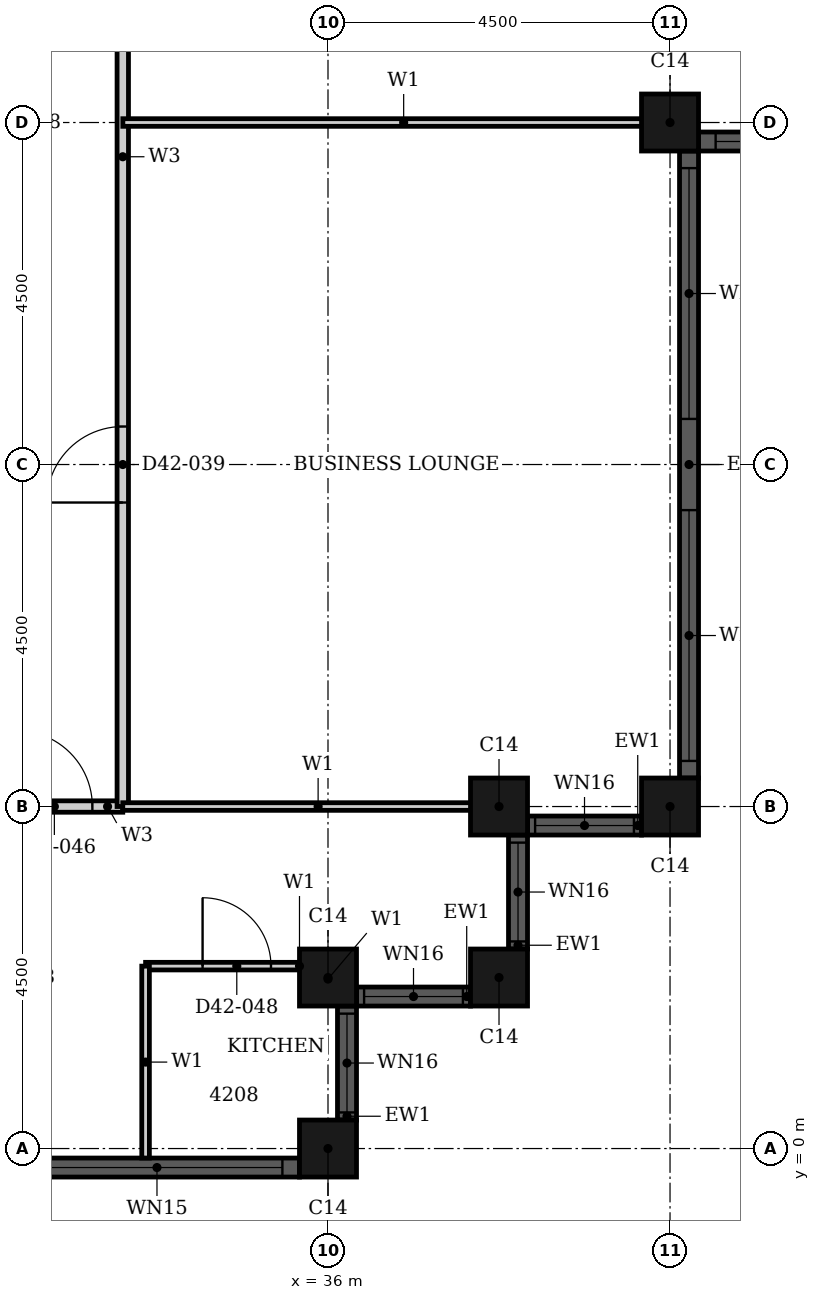
"""IFC4 building model, lengths in metres.
Left out: names, types, materials, properties, quantities, classifications, styles, units other than length and angle.
Written with IfcOpenShell. Run it as: python <this file> out.ifc"""

import sys

from ifc_helpers import new_model, si_unit, direction, frame, frame_2d, origin, origin_2d, place, context, subcontext, project, spatial, rectangle, hollow_rectangle, extrude, element, fill, save


model = new_model("IFC4")
c1 = context("Model", 3, precision=1e-05, world=origin(), true_north=direction((0.0, 1.0)))
c2 = subcontext(c1, "Body", "Model", "MODEL_VIEW")
j1 = project(units=[si_unit("LENGTHUNIT", "METRE"), si_unit("PLANEANGLEUNIT", "RADIAN")], contexts=[c1])
p1 = place(None, origin())
s1 = spatial("IfcSite", under=j1, at=p1, CompositionType="ELEMENT")
p2 = place(p1, origin())
s2 = spatial("IfcBuilding", under=s1, at=p2, CompositionType="ELEMENT")
p3 = place(p2, frame((0.0, 0.0, 169.1)))
s3 = spatial("IfcBuildingStorey", under=s2, at=p3, CompositionType="ELEMENT", Elevation=169.1)
for number, where, z_axis, x_axis in (
    (1, (36.0, 0.0, 0.0), (0.0, 0.0, 1.0), (1.0, 0.0, 0.0)),
    (2, (36.0, 2.25, 0.0), (0.0, 0.0, 1.0), (1.0, 0.0, 0.0)),
    (3, (38.25, 2.25, 0.0), (0.0, 0.0, 1.0), (1.0, 0.0, 0.0)),
    (4, (38.25, 4.5, 0.0), (0.0, 0.0, 1.0), (1.0, 0.0, 0.0)),
    (5, (40.5, 4.5, 0.0), (0.0, 0.0, 1.0), (1.0, 0.0, 0.0)),
    (6, (40.5, 13.5, 0.0), (0.0, 0.0, 1.0), (1.0, 0.0, 0.0)),
):
    element("IfcColumn", number, at=place(p3, frame(where, z_axis=z_axis, x_axis=x_axis)), inside=s3, PredefinedType="COLUMN", context=c2, shape_type="SweptSolid", body=[
        extrude(hollow_rectangle(XDim=0.75, YDim=0.75, WallThickness=0.024, at=origin_2d()), origin(), (0.0, 0.0, 1.0), 3.7),
    ])
p4 = place(p3, frame((27.375, -0.25, 0.0), z_axis=(0.0, 0.0, 1.0), x_axis=(1.0, 0.0, 0.0)))
e7 = element("IfcWall", 7, at=p4, inside=s3, PredefinedType="SOLIDWALL", context=c2, shape_type="SweptSolid", body=[
    extrude(rectangle(XDim=8.25, YDim=0.25, at=frame_2d((4.125, 0.0))), origin(), (0.0, 0.0, 1.0), 3.7),
])
p5 = place(p4, frame((0.225, 0.0, 0.45)))
e8 = element("IfcOpeningElement", 8, at=p5, cuts=e7, PredefinedType="OPENING", context=c2, shape_type="SweptSolid", body=[
    extrude(rectangle(XDim=3.3, YDim=2.3, at=frame_2d((1.65, 1.15))), frame((0.0, 0.135, 0.0), z_axis=(0.0, -1.0, 0.0), x_axis=(1.0, 0.0, 0.0)), (0.0, 0.0, 1.0), 0.27),
])
p6 = place(p4, frame((4.725, 0.0, 0.45)))
e9 = element("IfcOpeningElement", 9, at=p6, cuts=e7, PredefinedType="OPENING", context=c2, shape_type="SweptSolid", body=[
    extrude(rectangle(XDim=3.3, YDim=2.3, at=frame_2d((1.65, 1.15))), frame((0.0, 0.135, 0.0), z_axis=(0.0, -1.0, 0.0), x_axis=(1.0, 0.0, 0.0)), (0.0, 0.0, 1.0), 0.27),
])
p7 = place(p3, frame((36.25, 0.375, 0.0), z_axis=(0.0, 0.0, 1.0), x_axis=(0.0, 1.0, 0.0)))
e10 = element("IfcWall", 10, at=p7, inside=s3, PredefinedType="SOLIDWALL", context=c2, shape_type="SweptSolid", body=[
    extrude(rectangle(XDim=1.5, YDim=0.25, at=frame_2d((0.75, 0.0))), origin(), (0.0, 0.0, 1.0), 3.7),
])
p8 = place(p7, frame((0.1, 0.0, 0.9)))
e11 = element("IfcOpeningElement", 11, at=p8, cuts=e10, PredefinedType="OPENING", context=c2, shape_type="SweptSolid", body=[
    extrude(rectangle(XDim=1.3, YDim=1.85, at=frame_2d((0.65, 0.925))), frame((0.0, 0.135, 0.0), z_axis=(0.0, -1.0, 0.0), x_axis=(1.0, 0.0, 0.0)), (0.0, 0.0, 1.0), 0.27),
])
p9 = place(p3, frame((36.375, 2.0, 0.0), z_axis=(0.0, 0.0, 1.0), x_axis=(1.0, 0.0, 0.0)))
e12 = element("IfcWall", 12, at=p9, inside=s3, PredefinedType="SOLIDWALL", context=c2, shape_type="SweptSolid", body=[
    extrude(rectangle(XDim=1.5, YDim=0.25, at=frame_2d((0.75, 0.0))), origin(), (0.0, 0.0, 1.0), 3.7),
])
p10 = place(p9, frame((0.1, 0.0, 0.9)))
e13 = element("IfcOpeningElement", 13, at=p10, cuts=e12, PredefinedType="OPENING", context=c2, shape_type="SweptSolid", body=[
    extrude(rectangle(XDim=1.3, YDim=1.85, at=frame_2d((0.65, 0.925))), frame((0.0, 0.135, 0.0), z_axis=(0.0, -1.0, 0.0), x_axis=(1.0, 0.0, 0.0)), (0.0, 0.0, 1.0), 0.27),
])
p11 = place(p3, frame((38.5, 2.625, 0.0), z_axis=(0.0, 0.0, 1.0), x_axis=(0.0, 1.0, 0.0)))
e14 = element("IfcWall", 14, at=p11, inside=s3, PredefinedType="SOLIDWALL", context=c2, shape_type="SweptSolid", body=[
    extrude(rectangle(XDim=1.5, YDim=0.25, at=frame_2d((0.75, 0.0))), origin(), (0.0, 0.0, 1.0), 3.7),
])
p12 = place(p11, frame((0.1, 0.0, 0.9)))
e15 = element("IfcOpeningElement", 15, at=p12, cuts=e14, PredefinedType="OPENING", context=c2, shape_type="SweptSolid", body=[
    extrude(rectangle(XDim=1.3, YDim=1.85, at=frame_2d((0.65, 0.925))), frame((0.0, 0.135, 0.0), z_axis=(0.0, -1.0, 0.0), x_axis=(1.0, 0.0, 0.0)), (0.0, 0.0, 1.0), 0.27),
])
p13 = place(p3, frame((38.625, 4.25, 0.0), z_axis=(0.0, 0.0, 1.0), x_axis=(1.0, 0.0, 0.0)))
e16 = element("IfcWall", 16, at=p13, inside=s3, PredefinedType="SOLIDWALL", context=c2, shape_type="SweptSolid", body=[
    extrude(rectangle(XDim=1.5, YDim=0.25, at=frame_2d((0.75, 0.0))), origin(), (0.0, 0.0, 1.0), 3.7),
])
p14 = place(p13, frame((0.1, 0.0, 0.9)))
e17 = element("IfcOpeningElement", 17, at=p14, cuts=e16, PredefinedType="OPENING", context=c2, shape_type="SweptSolid", body=[
    extrude(rectangle(XDim=1.3, YDim=1.85, at=frame_2d((0.65, 0.925))), frame((0.0, 0.135, 0.0), z_axis=(0.0, -1.0, 0.0), x_axis=(1.0, 0.0, 0.0)), (0.0, 0.0, 1.0), 0.27),
])
p15 = place(p3, frame((40.75, 4.875, 0.0), z_axis=(0.0, 0.0, 1.0), x_axis=(0.0, 1.0, 0.0)))
e18 = element("IfcWall", 18, at=p15, inside=s3, PredefinedType="SOLIDWALL", context=c2, shape_type="SweptSolid", body=[
    extrude(rectangle(XDim=8.25, YDim=0.25, at=frame_2d((4.125, 0.0))), origin(), (0.0, 0.0, 1.0), 3.7),
])
p16 = place(p15, frame((0.225, 0.0, 0.45)))
e19 = element("IfcOpeningElement", 19, at=p16, cuts=e18, PredefinedType="OPENING", context=c2, shape_type="SweptSolid", body=[
    extrude(rectangle(XDim=3.3, YDim=2.3, at=frame_2d((1.65, 1.15))), frame((0.0, 0.135, 0.0), z_axis=(0.0, -1.0, 0.0), x_axis=(1.0, 0.0, 0.0)), (0.0, 0.0, 1.0), 0.27),
])
p17 = place(p15, frame((4.725, 0.0, 0.45)))
e20 = element("IfcOpeningElement", 20, at=p17, cuts=e18, PredefinedType="OPENING", context=c2, shape_type="SweptSolid", body=[
    extrude(rectangle(XDim=3.3, YDim=2.3, at=frame_2d((1.65, 1.15))), frame((0.0, 0.135, 0.0), z_axis=(0.0, -1.0, 0.0), x_axis=(1.0, 0.0, 0.0)), (0.0, 0.0, 1.0), 0.27),
])
p18 = place(p3, frame((40.875, 13.25, 0.0), z_axis=(0.0, 0.0, 1.0), x_axis=(1.0, 0.0, 0.0)))
e21 = element("IfcWall", 21, at=p18, inside=s3, PredefinedType="SOLIDWALL", context=c2, shape_type="SweptSolid", body=[
    extrude(rectangle(XDim=3.75, YDim=0.25, at=frame_2d((1.875, 0.0))), origin(), (0.0, 0.0, 1.0), 3.7),
])
p19 = place(p18, frame((0.225, 0.0, 0.45)))
e22 = element("IfcOpeningElement", 22, at=p19, cuts=e21, PredefinedType="OPENING", context=c2, shape_type="SweptSolid", body=[
    extrude(rectangle(XDim=3.3, YDim=2.3, at=frame_2d((1.65, 1.15))), frame((0.0, 0.135, 0.0), z_axis=(0.0, -1.0, 0.0), x_axis=(1.0, 0.0, 0.0)), (0.0, 0.0, 1.0), 0.27),
])
p20 = place(p3, frame((31.5, 4.5, 0.0), z_axis=(0.0, 0.0, 1.0), x_axis=(1.0, 0.0, 0.0)))
e23 = element("IfcWall", 23, at=p20, inside=s3, PredefinedType="PARTITIONING", context=c2, shape_type="SweptSolid", body=[
    extrude(rectangle(XDim=1.8, YDim=0.15, at=frame_2d((0.9, 0.0))), origin(), (0.0, 0.0, 1.0), 3.4),
])
p21 = place(p20, frame((0.4, 0.0, 0.0)))
e24 = element("IfcOpeningElement", 24, at=p21, cuts=e23, PredefinedType="OPENING", context=c2, shape_type="SweptSolid", body=[
    extrude(rectangle(XDim=1.0, YDim=2.2, at=frame_2d((0.5, 1.1))), frame((0.0, 0.085, 0.0), z_axis=(0.0, -1.0, 0.0), x_axis=(1.0, 0.0, 0.0)), (0.0, 0.0, 1.0), 0.17),
])
p22 = place(p3, frame((33.3, 4.5, 0.0), z_axis=(0.0, 0.0, 1.0), x_axis=(0.0, 1.0, 0.0)))
e25 = element("IfcWall", 25, at=p22, inside=s3, PredefinedType="PARTITIONING", context=c2, shape_type="SweptSolid", body=[
    extrude(rectangle(XDim=16.199, YDim=0.15, at=frame_2d((8.1, 0.0))), origin(), (0.0, 0.0, 1.0), 3.4),
])
p23 = place(p22, frame((12.099, 0.0, 0.0)))
e26 = element("IfcOpeningElement", 26, at=p23, cuts=e25, PredefinedType="OPENING", context=c2, shape_type="SweptSolid", body=[
    extrude(rectangle(XDim=1.0, YDim=2.2, at=frame_2d((0.5, 1.1))), frame((0.0, 0.085, 0.0), z_axis=(0.0, -1.0, 0.0), x_axis=(1.0, 0.0, 0.0)), (0.0, 0.0, 1.0), 0.17),
])
p24 = place(p22, frame((4.0, 0.0, 0.0)))
e27 = element("IfcOpeningElement", 27, at=p24, cuts=e25, PredefinedType="OPENING", context=c2, shape_type="SweptSolid", body=[
    extrude(rectangle(XDim=1.0, YDim=2.1, at=frame_2d((0.5, 1.05))), frame((0.0, 0.085, 0.0), z_axis=(0.0, -1.0, 0.0), x_axis=(1.0, 0.0, 0.0)), (0.0, 0.0, 1.0), 0.17),
])
p25 = place(p3, frame((33.301, 13.5, 0.0), z_axis=(0.0, 0.0, 1.0), x_axis=(1.0, 0.0, 0.0)))
e28 = element("IfcWall", 28, at=p25, inside=s3, PredefinedType="PARTITIONING", context=c2, shape_type="SweptSolid", body=[
    extrude(rectangle(XDim=7.389, YDim=0.1, at=frame_2d((3.694, 0.0))), origin(), (0.0, 0.0, 1.0), 2.48),
])
p26 = place(p3, frame((33.6, 2.4, 0.0), z_axis=(0.0, 0.0, 1.0), x_axis=(1.0, 0.0, 0.0)))
e29 = element("IfcWall", 29, at=p26, inside=s3, PredefinedType="PARTITIONING", context=c2, shape_type="SweptSolid", body=[
    extrude(rectangle(XDim=2.4, YDim=0.1, at=frame_2d((1.2, 0.0))), origin(), (0.0, 0.0, 1.0), 3.4),
])
p27 = place(p26, frame((0.75, 0.0, 0.0)))
e30 = element("IfcOpeningElement", 30, at=p27, cuts=e29, PredefinedType="OPENING", context=c2, shape_type="SweptSolid", body=[
    extrude(rectangle(XDim=0.9, YDim=2.1, at=frame_2d((0.45, 1.05))), frame((0.0, 0.06, 0.0), z_axis=(0.0, -1.0, 0.0), x_axis=(1.0, 0.0, 0.0)), (0.0, 0.0, 1.0), 0.12),
])
p28 = place(p3, frame((33.3, 4.5, 0.0), z_axis=(0.0, 0.0, 1.0), x_axis=(1.0, 0.0, 0.0)))
e31 = element("IfcWall", 31, at=p28, inside=s3, PredefinedType="PARTITIONING", context=c2, shape_type="SweptSolid", body=[
    extrude(rectangle(XDim=5.14, YDim=0.1, at=frame_2d((2.57, 0.0))), origin(), (0.0, 0.0, 1.0), 3.4),
])
p29 = place(p3, frame((33.6, -0.125, 0.0), z_axis=(0.0, 0.0, 1.0), x_axis=(0.0, 1.0, 0.0)))
e32 = element("IfcWall", 32, at=p29, inside=s3, PredefinedType="PARTITIONING", context=c2, shape_type="SweptSolid", body=[
    extrude(rectangle(XDim=2.525, YDim=0.1, at=frame_2d((1.262, 0.0))), origin(), (0.0, 0.0, 1.0), 3.4),
])
p30 = place(p3, frame((36.0, 2.06, 0.0), z_axis=(0.0, 0.0, 1.0), x_axis=(0.0, 1.0, 0.0)))
e33 = element("IfcWall", 33, at=p30, inside=s3, PredefinedType="PARTITIONING", context=c2, shape_type="SweptSolid", body=[
    extrude(rectangle(XDim=0.34, YDim=0.1, at=frame_2d((0.17, 0.0))), origin(), (0.0, 0.0, 1.0), 3.4),
])
p31 = place(p6, origin())
e34 = element("IfcWindow", 34, at=p31, inside=s3, PartitioningType="SINGLE_PANEL", PredefinedType="WINDOW", context=c2, shape_type="SweptSolid", body=[
    extrude(rectangle(XDim=3.3, YDim=2.3, at=frame_2d((1.65, 1.15))), frame((0.0, 0.03, 0.0), z_axis=(0.0, -1.0, 0.0), x_axis=(1.0, 0.0, 0.0)), (0.0, 0.0, 1.0), 0.06),
])
fill(e9, e34)
p32 = place(p8, origin())
e35 = element("IfcWindow", 35, at=p32, inside=s3, PartitioningType="SINGLE_PANEL", PredefinedType="WINDOW", context=c2, shape_type="SweptSolid", body=[
    extrude(rectangle(XDim=1.3, YDim=1.85, at=frame_2d((0.65, 0.925))), frame((0.0, 0.03, 0.0), z_axis=(0.0, -1.0, 0.0), x_axis=(1.0, 0.0, 0.0)), (0.0, 0.0, 1.0), 0.06),
])
fill(e11, e35)
p33 = place(p10, origin())
e36 = element("IfcWindow", 36, at=p33, inside=s3, PartitioningType="SINGLE_PANEL", PredefinedType="WINDOW", context=c2, shape_type="SweptSolid", body=[
    extrude(rectangle(XDim=1.3, YDim=1.85, at=frame_2d((0.65, 0.925))), frame((0.0, 0.03, 0.0), z_axis=(0.0, -1.0, 0.0), x_axis=(1.0, 0.0, 0.0)), (0.0, 0.0, 1.0), 0.06),
])
fill(e13, e36)
p34 = place(p12, origin())
e37 = element("IfcWindow", 37, at=p34, inside=s3, PartitioningType="SINGLE_PANEL", PredefinedType="WINDOW", context=c2, shape_type="SweptSolid", body=[
    extrude(rectangle(XDim=1.3, YDim=1.85, at=frame_2d((0.65, 0.925))), frame((0.0, 0.03, 0.0), z_axis=(0.0, -1.0, 0.0), x_axis=(1.0, 0.0, 0.0)), (0.0, 0.0, 1.0), 0.06),
])
fill(e15, e37)
p35 = place(p14, origin())
e38 = element("IfcWindow", 38, at=p35, inside=s3, PartitioningType="SINGLE_PANEL", PredefinedType="WINDOW", context=c2, shape_type="SweptSolid", body=[
    extrude(rectangle(XDim=1.3, YDim=1.85, at=frame_2d((0.65, 0.925))), frame((0.0, 0.03, 0.0), z_axis=(0.0, -1.0, 0.0), x_axis=(1.0, 0.0, 0.0)), (0.0, 0.0, 1.0), 0.06),
])
fill(e17, e38)
p36 = place(p16, origin())
e39 = element("IfcWindow", 39, at=p36, inside=s3, PartitioningType="SINGLE_PANEL", PredefinedType="WINDOW", context=c2, shape_type="SweptSolid", body=[
    extrude(rectangle(XDim=3.3, YDim=2.3, at=frame_2d((1.65, 1.15))), frame((0.0, 0.03, 0.0), z_axis=(0.0, -1.0, 0.0), x_axis=(1.0, 0.0, 0.0)), (0.0, 0.0, 1.0), 0.06),
])
fill(e19, e39)
p37 = place(p17, origin())
e40 = element("IfcWindow", 40, at=p37, inside=s3, PartitioningType="SINGLE_PANEL", PredefinedType="WINDOW", context=c2, shape_type="SweptSolid", body=[
    extrude(rectangle(XDim=3.3, YDim=2.3, at=frame_2d((1.65, 1.15))), frame((0.0, 0.03, 0.0), z_axis=(0.0, -1.0, 0.0), x_axis=(1.0, 0.0, 0.0)), (0.0, 0.0, 1.0), 0.06),
])
fill(e20, e40)
p38 = place(p19, origin())
e41 = element("IfcWindow", 41, at=p38, inside=s3, PartitioningType="SINGLE_PANEL", PredefinedType="WINDOW", context=c2, shape_type="SweptSolid", body=[
    extrude(rectangle(XDim=3.3, YDim=2.3, at=frame_2d((1.65, 1.15))), frame((0.0, 0.03, 0.0), z_axis=(0.0, -1.0, 0.0), x_axis=(1.0, 0.0, 0.0)), (0.0, 0.0, 1.0), 0.06),
])
fill(e22, e41)
p39 = place(p24, origin())
e42 = element("IfcDoor", 42, at=p39, inside=s3, OperationType="SINGLE_SWING_RIGHT", PredefinedType="DOOR", context=c2, shape_type="SweptSolid", body=[
    extrude(rectangle(XDim=1.0, YDim=2.1, at=frame_2d((0.5, 1.05))), frame((0.0, 0.025, 0.0), z_axis=(0.0, -1.0, 0.0), x_axis=(1.0, 0.0, 0.0)), (0.0, 0.0, 1.0), 0.05),
])
fill(e27, e42)
p40 = place(p21, origin())
e43 = element("IfcDoor", 43, at=p40, inside=s3, OperationType="SINGLE_SWING_RIGHT", PredefinedType="DOOR", context=c2, shape_type="SweptSolid", body=[
    extrude(rectangle(XDim=1.0, YDim=2.2, at=frame_2d((0.5, 1.1))), frame((0.0, 0.025, 0.0), z_axis=(0.0, -1.0, 0.0), x_axis=(1.0, 0.0, 0.0)), (0.0, 0.0, 1.0), 0.05),
])
fill(e24, e43)
p41 = place(p27, origin())
e44 = element("IfcDoor", 44, at=p41, inside=s3, OperationType="SINGLE_SWING_RIGHT", PredefinedType="DOOR", context=c2, shape_type="SweptSolid", body=[
    extrude(rectangle(XDim=0.9, YDim=2.1, at=frame_2d((0.45, 1.05))), frame((0.0, 0.025, 0.0), z_axis=(0.0, -1.0, 0.0), x_axis=(1.0, 0.0, 0.0)), (0.0, 0.0, 1.0), 0.05),
])
fill(e30, e44)
save(model, sys.argv[1])
